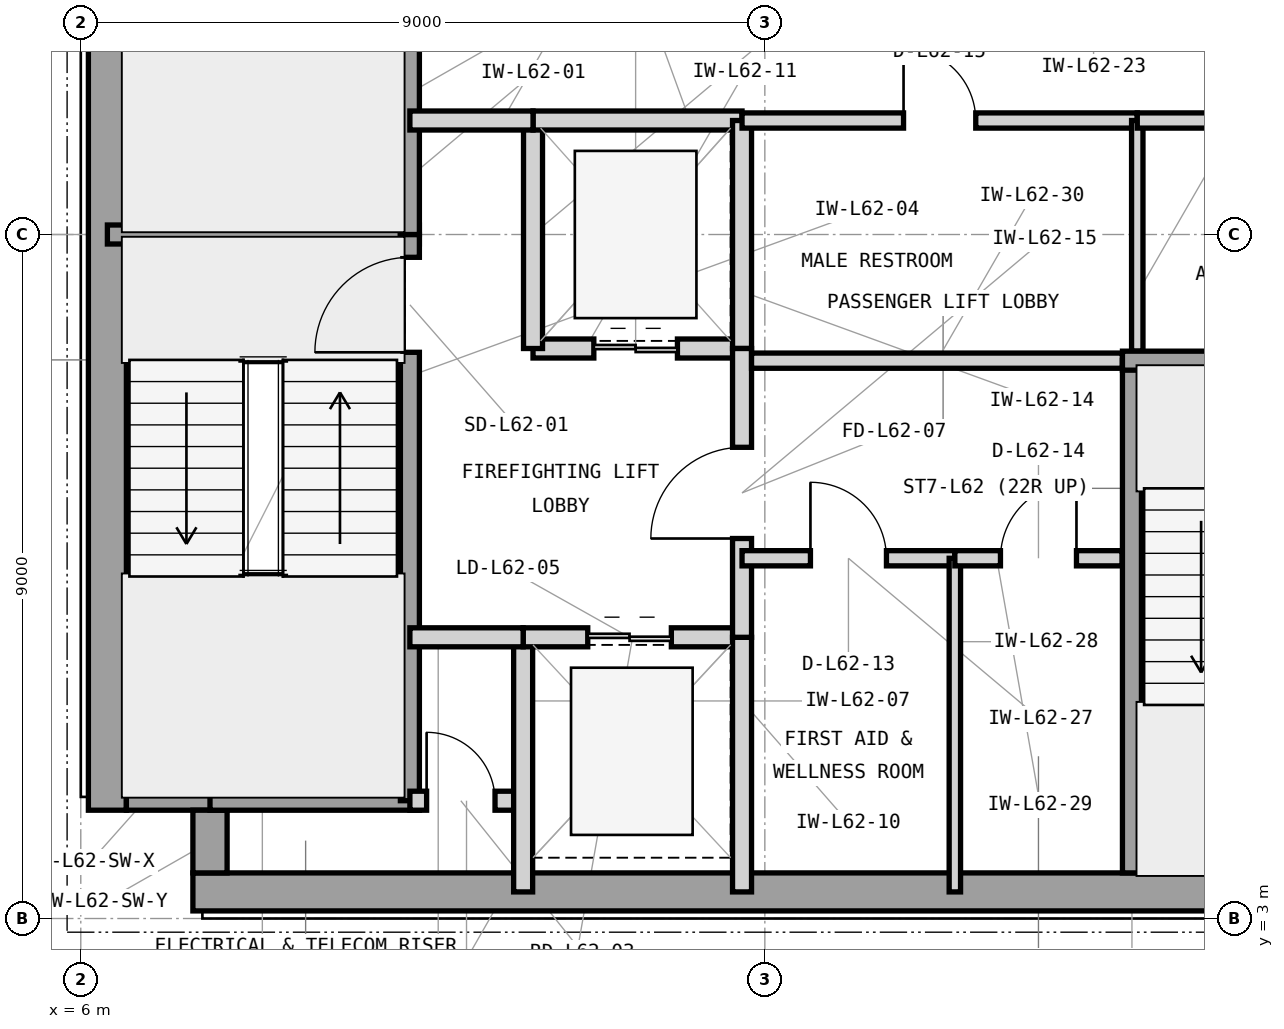
"""IFC4 building model, lengths in metres.
Left out: names, types, materials, properties, quantities, classifications, styles, units other than length and angle.
Written with IfcOpenShell. Run it as: python <this file> out.ifc"""

import sys

from ifc_helpers import new_model, si_unit, direction, frame, frame_2d, origin, place, context, subcontext, project, spatial, rectangle, extrude, element, fill, save


model = new_model("IFC4")
c1 = context("Model", 3, precision=1e-05, world=origin(), true_north=direction((0.0, 1.0)))
c2 = subcontext(c1, "Body", "Model", "MODEL_VIEW")
j1 = project(units=[si_unit("LENGTHUNIT", "METRE"), si_unit("PLANEANGLEUNIT", "RADIAN")], contexts=[c1])
p1 = place(None, origin())
s1 = spatial("IfcSite", under=j1, at=p1, CompositionType="ELEMENT")
p2 = place(p1, origin())
s2 = spatial("IfcBuilding", under=s1, at=p2, CompositionType="ELEMENT")
p3 = place(p2, frame((0.0, 0.0, 254.7)))
s3 = spatial("IfcBuildingStorey", under=s2, at=p3, CompositionType="ELEMENT", Elevation=254.7)
p4 = place(p3, frame((7.475, 3.35, 0.0), z_axis=(0.0, 0.0, 1.0), x_axis=(1.0, 0.0, 0.0)))
e1 = element("IfcWall", 1, at=p4, inside=s3, PredefinedType="SHEAR", context=c2, shape_type="SweptSolid", body=[
    extrude(rectangle(XDim=16.425, YDim=0.5, at=frame_2d((8.212, 0.0))), origin(), (0.0, 0.0, 1.0), 3.9),
])
p5 = place(p3, frame((6.35, 4.425, 0.0), z_axis=(0.0, 0.0, 1.0), x_axis=(0.0, 1.0, 0.0)))
e2 = element("IfcWall", 2, at=p5, inside=s3, PredefinedType="SHEAR", context=c2, shape_type="SweptSolid", body=[
    extrude(rectangle(XDim=15.15, YDim=0.5, at=frame_2d((7.575, 0.0))), origin(), (0.0, 0.0, 1.0), 3.9),
])
p6 = place(p3, frame((6.6, 4.65, 0.0), z_axis=(0.0, 0.0, 1.0), x_axis=(1.0, 0.0, 0.0)))
e3 = element("IfcWall", 3, at=p6, inside=s3, PredefinedType="SHEAR", context=c2, shape_type="SweptSolid", body=[
    extrude(rectangle(XDim=1.325, YDim=0.45, at=frame_2d((0.663, 0.0))), origin(), (0.0, 0.0, 1.0), 3.9),
])
p7 = place(p3, frame((7.7, 3.6, 0.0), z_axis=(0.0, 0.0, 1.0), x_axis=(0.0, 1.0, 0.0)))
e4 = element("IfcWall", 4, at=p7, inside=s3, PredefinedType="SHEAR", context=c2, shape_type="SweptSolid", body=[
    extrude(rectangle(XDim=0.825, YDim=0.45, at=frame_2d((0.413, 0.0))), origin(), (0.0, 0.0, 1.0), 3.9),
])
p8 = place(p3, frame((6.35, 12.0, 0.0), z_axis=(0.0, 0.0, 1.0), x_axis=(1.0, 0.0, 0.0)))
e5 = element("IfcWall", 5, at=p8, inside=s3, PredefinedType="SHEAR", context=c2, shape_type="SweptSolid", body=[
    extrude(rectangle(XDim=4.105, YDim=0.25, at=frame_2d((2.052, 0.0))), origin(), (0.0, 0.0, 1.0), 3.9),
])
p9 = place(p3, frame((7.7, 4.55, 0.0), z_axis=(0.0, 0.0, 1.0), x_axis=(1.0, 0.0, 0.0)))
e6 = element("IfcWall", 6, at=p9, inside=s3, PredefinedType="SHEAR", context=c2, shape_type="SweptSolid", body=[
    extrude(rectangle(XDim=2.755, YDim=0.25, at=frame_2d((1.377, 0.0))), origin(), (0.0, 0.0, 1.0), 3.9),
])
p10 = place(p3, frame((10.33, 4.55, 0.0), z_axis=(0.0, 0.0, 1.0), x_axis=(0.0, 1.0, 0.0)))
e7 = element("IfcWall", 7, at=p10, inside=s3, PredefinedType="SHEAR", context=c2, shape_type="SweptSolid", body=[
    extrude(rectangle(XDim=7.45, YDim=0.25, at=frame_2d((3.725, 0.0))), origin(), (0.0, 0.0, 1.0), 3.9),
])
p11 = place(p10, frame((5.9, 0.0, 0.0)))
e8 = element("IfcOpeningElement", 8, at=p11, cuts=e7, PredefinedType="OPENING", context=c2, shape_type="SweptSolid", body=[
    extrude(rectangle(XDim=1.25, YDim=2.2, at=frame_2d((0.625, 1.1))), frame((0.0, 0.135, 0.0), z_axis=(0.0, -1.0, 0.0), x_axis=(1.0, 0.0, 0.0)), (0.0, 0.0, 1.0), 0.27),
])
p12 = place(p3, frame((10.33, 12.0, 0.0), z_axis=(0.0, 0.0, 1.0), x_axis=(0.0, 1.0, 0.0)))
e9 = element("IfcWall", 9, at=p12, inside=s3, PredefinedType="SHEAR", context=c2, shape_type="SweptSolid", body=[
    extrude(rectangle(XDim=7.45, YDim=0.25, at=frame_2d((3.725, 0.0))), origin(), (0.0, 0.0, 1.0), 3.9),
])
p13 = place(p12, frame((5.85, 0.0, 0.0)))
e10 = element("IfcOpeningElement", 10, at=p13, cuts=e9, PredefinedType="OPENING", context=c2, shape_type="SweptSolid", body=[
    extrude(rectangle(XDim=1.25, YDim=2.2, at=frame_2d((0.625, 1.1))), frame((0.0, 0.135, 0.0), z_axis=(0.0, -1.0, 0.0), x_axis=(1.0, 0.0, 0.0)), (0.0, 0.0, 1.0), 0.27),
])
p14 = place(p3, frame((10.33, 4.55, 0.0), z_axis=(0.0, 0.0, 1.0), x_axis=(1.0, 0.0, 0.0)))
e11 = element("IfcWall", 11, at=p14, inside=s3, PredefinedType="PARTITIONING", context=c2, shape_type="SweptSolid", body=[
    extrude(rectangle(XDim=1.49, YDim=0.25, at=frame_2d((0.745, 0.0))), origin(), (0.0, 0.0, 1.0), 3.705),
])
p15 = place(p14, frame((0.22, 0.0, 0.0)))
e12 = element("IfcOpeningElement", 12, at=p15, cuts=e11, PredefinedType="OPENING", context=c2, shape_type="SweptSolid", body=[
    extrude(rectangle(XDim=0.9, YDim=2.1, at=frame_2d((0.45, 1.05))), frame((0.0, 0.135, 0.0), z_axis=(0.0, -1.0, 0.0), x_axis=(1.0, 0.0, 0.0)), (0.0, 0.0, 1.0), 0.27),
])
p16 = place(p3, frame((11.82, 3.35, 0.0), z_axis=(0.0, 0.0, 1.0), x_axis=(0.0, 1.0, 0.0)))
e13 = element("IfcWall", 13, at=p16, inside=s3, PredefinedType="PARTITIONING", context=c2, shape_type="SweptSolid", body=[
    extrude(rectangle(XDim=3.35, YDim=0.25, at=frame_2d((1.675, 0.0))), origin(), (0.0, 0.0, 1.0), 3.705),
])
p17 = place(p3, frame((11.82, 6.7, 0.0), z_axis=(0.0, 0.0, 1.0), x_axis=(1.0, 0.0, 0.0)))
e14 = element("IfcWall", 14, at=p17, inside=s3, PredefinedType="PARTITIONING", context=c2, shape_type="SweptSolid", body=[
    extrude(rectangle(XDim=2.88, YDim=0.25, at=frame_2d((1.44, 0.0))), origin(), (0.0, 0.0, 1.0), 3.088),
])
p18 = place(p17, frame((0.85, 0.0, 0.0)))
e15 = element("IfcOpeningElement", 15, at=p18, cuts=e14, PredefinedType="OPENING", context=c2, shape_type="SweptSolid", body=[
    extrude(rectangle(XDim=1.1, YDim=2.25, at=frame_2d((0.55, 1.125))), frame((0.0, 0.135, 0.0), z_axis=(0.0, -1.0, 0.0), x_axis=(1.0, 0.0, 0.0)), (0.0, 0.0, 1.0), 0.27),
])
p19 = place(p3, frame((14.7, 3.35, 0.0), z_axis=(0.0, 0.0, 1.0), x_axis=(0.0, 1.0, 0.0)))
e16 = element("IfcWall", 16, at=p19, inside=s3, PredefinedType="PARTITIONING", context=c2, shape_type="SweptSolid", body=[
    extrude(rectangle(XDim=3.35, YDim=0.25, at=frame_2d((1.675, 0.0))), origin(), (0.0, 0.0, 1.0), 3.705),
])
p20 = place(p3, frame((11.95, 10.5, 0.0), z_axis=(0.0, 0.0, 1.0), x_axis=(1.0, 0.0, 0.0)))
e17 = element("IfcWall", 17, at=p20, inside=s3, PredefinedType="PARTITIONING", context=c2, shape_type="SweptSolid", body=[
    extrude(rectangle(XDim=2.75, YDim=0.25, at=frame_2d((1.375, 0.0))), origin(), (0.0, 0.0, 1.0), 3.088),
])
p21 = place(p20, frame((0.8, 0.0, 0.0)))
e18 = element("IfcOpeningElement", 18, at=p21, cuts=e17, PredefinedType="OPENING", context=c2, shape_type="SweptSolid", body=[
    extrude(rectangle(XDim=1.1, YDim=2.25, at=frame_2d((0.55, 1.125))), frame((0.0, 0.135, 0.0), z_axis=(0.0, -1.0, 0.0), x_axis=(1.0, 0.0, 0.0)), (0.0, 0.0, 1.0), 0.27),
])
p22 = place(p3, frame((11.95, 10.5, 0.0), z_axis=(0.0, 0.0, 1.0), x_axis=(0.0, 1.0, 0.0)))
e19 = element("IfcWall", 19, at=p22, inside=s3, PredefinedType="PARTITIONING", context=c2, shape_type="SweptSolid", body=[
    extrude(rectangle(XDim=3.0, YDim=0.25, at=frame_2d((1.5, 0.0))), origin(), (0.0, 0.0, 1.0), 3.705),
])
p23 = place(p3, frame((11.95, 13.5, 0.0), z_axis=(0.0, 0.0, 1.0), x_axis=(1.0, 0.0, 0.0)))
e20 = element("IfcWall", 20, at=p23, inside=s3, PredefinedType="PARTITIONING", context=c2, shape_type="SweptSolid", body=[
    extrude(rectangle(XDim=2.75, YDim=0.25, at=frame_2d((1.375, 0.0))), origin(), (0.0, 0.0, 1.0), 3.088),
])
p24 = place(p3, frame((14.7, 10.5, 0.0), z_axis=(0.0, 0.0, 1.0), x_axis=(0.0, 1.0, 0.0)))
e21 = element("IfcWall", 21, at=p24, inside=s3, PredefinedType="PARTITIONING", context=c2, shape_type="SweptSolid", body=[
    extrude(rectangle(XDim=3.0, YDim=0.25, at=frame_2d((1.5, 0.0))), origin(), (0.0, 0.0, 1.0), 3.705),
])
p25 = place(p3, frame((14.7, 6.7, 0.0), z_axis=(0.0, 0.0, 1.0), x_axis=(0.0, 1.0, 0.0)))
e22 = element("IfcWall", 22, at=p25, inside=s3, PredefinedType="PARTITIONING", context=c2, shape_type="SweptSolid", body=[
    extrude(rectangle(XDim=3.8, YDim=0.25, at=frame_2d((1.9, 0.0))), origin(), (0.0, 0.0, 1.0), 3.705),
])
p26 = place(p25, frame((1.3, 0.0, 0.0)))
e23 = element("IfcOpeningElement", 23, at=p26, cuts=e22, PredefinedType="OPENING", context=c2, shape_type="SweptSolid", body=[
    extrude(rectangle(XDim=1.2, YDim=2.2, at=frame_2d((0.6, 1.1))), frame((0.0, 0.135, 0.0), z_axis=(0.0, -1.0, 0.0), x_axis=(1.0, 0.0, 0.0)), (0.0, 0.0, 1.0), 0.27),
])
p27 = place(p3, frame((10.33, 13.5, 0.0), z_axis=(0.0, 0.0, 1.0), x_axis=(1.0, 0.0, 0.0)))
e24 = element("IfcWall", 24, at=p27, inside=s3, PredefinedType="PARTITIONING", context=c2, shape_type="SweptSolid", body=[
    extrude(rectangle(XDim=1.62, YDim=0.25, at=frame_2d((0.81, 0.0))), origin(), (0.0, 0.0, 1.0), 3.088),
])
p28 = place(p3, frame((10.33, 6.7, 0.0), z_axis=(0.0, 0.0, 1.0), x_axis=(1.0, 0.0, 0.0)))
e25 = element("IfcWall", 25, at=p28, inside=s3, PredefinedType="PARTITIONING", context=c2, shape_type="SweptSolid", body=[
    extrude(rectangle(XDim=1.49, YDim=0.25, at=frame_2d((0.745, 0.0))), origin(), (0.0, 0.0, 1.0), 3.088),
])
p29 = place(p3, frame((14.7, 7.74, 0.0), z_axis=(0.0, 0.0, 1.0), x_axis=(1.0, 0.0, 0.0)))
e26 = element("IfcWall", 26, at=p29, inside=s3, PredefinedType="PARTITIONING", context=c2, shape_type="SweptSolid", body=[
    extrude(rectangle(XDim=2.8, YDim=0.2, at=frame_2d((1.4, 0.0))), origin(), (0.0, 0.0, 1.0), 3.705),
])
p30 = place(p29, frame((0.9, 0.0, 0.0)))
e27 = element("IfcOpeningElement", 27, at=p30, cuts=e26, PredefinedType="OPENING", context=c2, shape_type="SweptSolid", body=[
    extrude(rectangle(XDim=1.0, YDim=2.15, at=frame_2d((0.5, 1.075))), frame((0.0, 0.11, 0.0), z_axis=(0.0, -1.0, 0.0), x_axis=(1.0, 0.0, 0.0)), (0.0, 0.0, 1.0), 0.22),
])
p31 = place(p3, frame((17.5, 3.35, 0.0), z_axis=(0.0, 0.0, 1.0), x_axis=(0.0, 1.0, 0.0)))
e28 = element("IfcWall", 28, at=p31, inside=s3, PredefinedType="PARTITIONING", context=c2, shape_type="SweptSolid", body=[
    extrude(rectangle(XDim=4.39, YDim=0.15, at=frame_2d((2.195, 0.0))), origin(), (0.0, 0.0, 1.0), 3.705),
])
p32 = place(p3, frame((17.5, 7.74, 0.0), z_axis=(0.0, 0.0, 1.0), x_axis=(1.0, 0.0, 0.0)))
e29 = element("IfcWall", 29, at=p32, inside=s3, PredefinedType="PARTITIONING", context=c2, shape_type="SweptSolid", body=[
    extrude(rectangle(XDim=2.2, YDim=0.2, at=frame_2d((1.1, 0.0))), origin(), (0.0, 0.0, 1.0), 3.705),
])
p33 = place(p32, frame((0.6, 0.0, 0.0)))
e30 = element("IfcOpeningElement", 30, at=p33, cuts=e29, PredefinedType="OPENING", context=c2, shape_type="SweptSolid", body=[
    extrude(rectangle(XDim=1.0, YDim=2.15, at=frame_2d((0.5, 1.075))), frame((0.0, 0.11, 0.0), z_axis=(0.0, -1.0, 0.0), x_axis=(1.0, 0.0, 0.0)), (0.0, 0.0, 1.0), 0.22),
])
p34 = place(p3, frame((14.825, 10.34, 0.0), z_axis=(0.0, 0.0, 1.0), x_axis=(1.0, 0.0, 0.0)))
e31 = element("IfcWall", 31, at=p34, inside=s3, PredefinedType="PARTITIONING", context=c2, shape_type="SweptSolid", body=[
    extrude(rectangle(XDim=4.88, YDim=0.2, at=frame_2d((2.44, 0.0))), origin(), (0.0, 0.0, 1.0), 3.088),
])
p35 = place(p3, frame((14.7, 13.5, 0.0), z_axis=(0.0, 0.0, 1.0), x_axis=(1.0, 0.0, 0.0)))
e32 = element("IfcWall", 32, at=p35, inside=s3, PredefinedType="PARTITIONING", context=c2, shape_type="SweptSolid", body=[
    extrude(rectangle(XDim=5.2, YDim=0.2, at=frame_2d((2.6, 0.0))), origin(), (0.0, 0.0, 1.0), 3.088),
])
p36 = place(p35, frame((2.125, 0.0, 0.0)))
e33 = element("IfcOpeningElement", 33, at=p36, cuts=e32, PredefinedType="OPENING", context=c2, shape_type="SweptSolid", body=[
    extrude(rectangle(XDim=0.95, YDim=2.1, at=frame_2d((0.475, 1.05))), frame((0.0, 0.11, 0.0), z_axis=(0.0, -1.0, 0.0), x_axis=(1.0, 0.0, 0.0)), (0.0, 0.0, 1.0), 0.22),
])
p37 = place(p3, frame((19.9, 10.465, 0.0), z_axis=(0.0, 0.0, 1.0), x_axis=(0.0, 1.0, 0.0)))
e34 = element("IfcWall", 34, at=p37, inside=s3, PredefinedType="PARTITIONING", context=c2, shape_type="SweptSolid", body=[
    extrude(rectangle(XDim=3.035, YDim=0.15, at=frame_2d((1.518, 0.0))), origin(), (0.0, 0.0, 1.0), 3.705),
])
p38 = place(p3, frame((19.9, 13.5, 0.0), z_axis=(0.0, 0.0, 1.0), x_axis=(1.0, 0.0, 0.0)))
e35 = element("IfcWall", 35, at=p38, inside=s3, PredefinedType="PARTITIONING", context=c2, shape_type="SweptSolid", body=[
    extrude(rectangle(XDim=3.75, YDim=0.2, at=frame_2d((1.875, 0.0))), origin(), (0.0, 0.0, 1.0), 3.088),
])
p39 = place(p38, frame((1.4, 0.0, 0.0)))
e36 = element("IfcOpeningElement", 36, at=p39, cuts=e35, PredefinedType="OPENING", context=c2, shape_type="SweptSolid", body=[
    extrude(rectangle(XDim=0.95, YDim=2.1, at=frame_2d((0.475, 1.05))), frame((0.0, 0.11, 0.0), z_axis=(0.0, -1.0, 0.0), x_axis=(1.0, 0.0, 0.0)), (0.0, 0.0, 1.0), 0.22),
])
p40 = place(p3, frame((19.83, 3.6, 0.0), z_axis=(0.0, 0.0, 1.0), x_axis=(0.0, 1.0, 0.0)))
e37 = element("IfcWall", 37, at=p40, inside=s3, PredefinedType="SHEAR", context=c2, shape_type="SweptSolid", body=[
    extrude(rectangle(XDim=6.74, YDim=0.25, at=frame_2d((3.37, 0.0))), origin(), (0.0, 0.0, 1.0), 3.9),
])
p41 = place(p3, frame((19.705, 10.34, 0.0), z_axis=(0.0, 0.0, 1.0), x_axis=(1.0, 0.0, 0.0)))
e38 = element("IfcWall", 38, at=p41, inside=s3, PredefinedType="SHEAR", context=c2, shape_type="SweptSolid", body=[
    extrude(rectangle(XDim=3.82, YDim=0.25, at=frame_2d((1.91, 0.0))), origin(), (0.0, 0.0, 1.0), 3.9),
])
p42 = place(p11, origin())
e39 = element("IfcDoor", 39, at=p42, inside=s3, OperationType="SINGLE_SWING_LEFT", PredefinedType="DOOR", context=c2, shape_type="SweptSolid", body=[
    extrude(rectangle(XDim=1.25, YDim=2.2, at=frame_2d((0.625, 1.1))), frame((0.0, 0.025, 0.0), z_axis=(0.0, -1.0, 0.0), x_axis=(1.0, 0.0, 0.0)), (0.0, 0.0, 1.0), 0.05),
])
fill(e8, e39)
p43 = place(p15, origin())
e40 = element("IfcDoor", 40, at=p43, inside=s3, OperationType="SINGLE_SWING_LEFT", PredefinedType="TRAPDOOR", context=c2, shape_type="SweptSolid", body=[
    extrude(rectangle(XDim=0.9, YDim=2.1, at=frame_2d((0.45, 1.05))), frame((0.0, 0.025, 0.0), z_axis=(0.0, -1.0, 0.0), x_axis=(1.0, 0.0, 0.0)), (0.0, 0.0, 1.0), 0.05),
])
fill(e12, e40)
p44 = place(p18, origin())
e41 = element("IfcDoor", 41, at=p44, inside=s3, OperationType="DOUBLE_DOOR_SLIDING", PredefinedType="DOOR", context=c2, shape_type="SweptSolid", body=[
    extrude(rectangle(XDim=1.1, YDim=2.25, at=frame_2d((0.55, 1.125))), frame((0.0, 0.025, 0.0), z_axis=(0.0, -1.0, 0.0), x_axis=(1.0, 0.0, 0.0)), (0.0, 0.0, 1.0), 0.05),
])
fill(e15, e41)
p45 = place(p21, origin())
e42 = element("IfcDoor", 42, at=p45, inside=s3, OperationType="DOUBLE_DOOR_SLIDING", PredefinedType="DOOR", context=c2, shape_type="SweptSolid", body=[
    extrude(rectangle(XDim=1.1, YDim=2.25, at=frame_2d((0.55, 1.125))), frame((0.0, 0.025, 0.0), z_axis=(0.0, -1.0, 0.0), x_axis=(1.0, 0.0, 0.0)), (0.0, 0.0, 1.0), 0.05),
])
fill(e18, e42)
p46 = place(p26, origin())
e43 = element("IfcDoor", 43, at=p46, inside=s3, OperationType="SINGLE_SWING_LEFT", PredefinedType="DOOR", context=c2, shape_type="SweptSolid", body=[
    extrude(rectangle(XDim=1.2, YDim=2.2, at=frame_2d((0.6, 1.1))), frame((0.0, 0.025, 0.0), z_axis=(0.0, -1.0, 0.0), x_axis=(1.0, 0.0, 0.0)), (0.0, 0.0, 1.0), 0.05),
])
fill(e23, e43)
p47 = place(p30, origin())
e44 = element("IfcDoor", 44, at=p47, inside=s3, OperationType="SINGLE_SWING_LEFT", PredefinedType="DOOR", context=c2, shape_type="SweptSolid", body=[
    extrude(rectangle(XDim=1.0, YDim=2.15, at=frame_2d((0.5, 1.075))), frame((0.0, 0.025, 0.0), z_axis=(0.0, -1.0, 0.0), x_axis=(1.0, 0.0, 0.0)), (0.0, 0.0, 1.0), 0.05),
])
fill(e27, e44)
p48 = place(p33, origin())
e45 = element("IfcDoor", 45, at=p48, inside=s3, OperationType="SINGLE_SWING_RIGHT", PredefinedType="DOOR", context=c2, shape_type="SweptSolid", body=[
    extrude(rectangle(XDim=1.0, YDim=2.15, at=frame_2d((0.5, 1.075))), frame((0.0, 0.025, 0.0), z_axis=(0.0, -1.0, 0.0), x_axis=(1.0, 0.0, 0.0)), (0.0, 0.0, 1.0), 0.05),
])
fill(e30, e45)
p49 = place(p36, origin())
e46 = element("IfcDoor", 46, at=p49, inside=s3, OperationType="SINGLE_SWING_LEFT", PredefinedType="DOOR", context=c2, shape_type="SweptSolid", body=[
    extrude(rectangle(XDim=0.95, YDim=2.1, at=frame_2d((0.475, 1.05))), frame((0.0, 0.025, 0.0), z_axis=(0.0, -1.0, 0.0), x_axis=(1.0, 0.0, 0.0)), (0.0, 0.0, 1.0), 0.05),
])
fill(e33, e46)
save(model, sys.argv[1])
